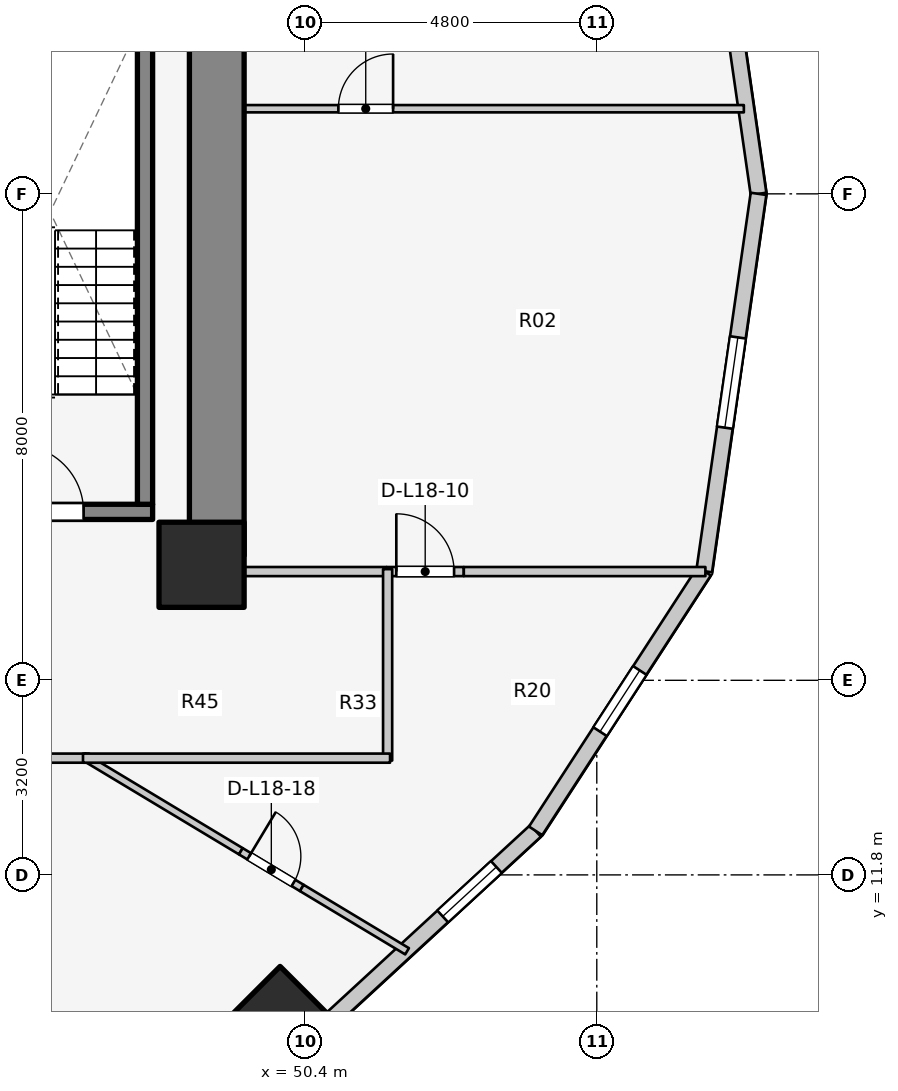
"""IFC4 building model, lengths in metres.
Left out: names, types, materials, properties, quantities, classifications, styles, units other than length and angle.
Written with IfcOpenShell. Run it as: python <this file> out.ifc"""

import sys

from ifc_helpers import new_model, si_unit, direction, frame, frame_2d, origin, origin_2d, place, context, subcontext, project, spatial, rectangle, extrude, element, fill, save


model = new_model("IFC4")
c1 = context("Model", 3, precision=1e-05, world=origin(), true_north=direction((0.0, 1.0)))
c2 = subcontext(c1, "Body", "Model", "MODEL_VIEW")
j1 = project(units=[si_unit("LENGTHUNIT", "METRE"), si_unit("PLANEANGLEUNIT", "RADIAN")], contexts=[c1])
p1 = place(None, origin())
s1 = spatial("IfcSite", under=j1, at=p1, CompositionType="ELEMENT")
p2 = place(p1, origin())
s2 = spatial("IfcBuilding", under=s1, at=p2, CompositionType="ELEMENT")
p3 = place(p2, frame((0.0, 0.0, 61.7)))
s3 = spatial("IfcBuildingStorey", under=s2, at=p3, CompositionType="ELEMENT", Elevation=61.7)
p4 = place(p3, frame((48.95, 17.05, 0.0), z_axis=(0.0, 0.0, 1.0), x_axis=(0.0, 1.0, 0.0)))
e1 = element("IfcWall", 1, at=p4, inside=s3, PredefinedType="SHEAR", context=c2, shape_type="SweptSolid", body=[
    extrude(rectangle(XDim=12.8, YDim=0.9, at=frame_2d((6.4, 0.0))), origin(), (0.0, 0.0, 1.0), 3.1),
])
p5 = place(p3, frame((44.525, 17.77, 0.0), z_axis=(0.0, 0.0, 1.0), x_axis=(1.0, 0.0, 0.0)))
e2 = element("IfcWall", 2, at=p5, inside=s3, PredefinedType="SOLIDWALL", context=c2, shape_type="SweptSolid", body=[
    extrude(rectangle(XDim=3.37, YDim=0.25, at=frame_2d((1.685, 0.0))), origin(), (0.0, 0.0, 1.0), 3.1),
])
p6 = place(p5, frame((1.135, 0.0, 0.0)))
e3 = element("IfcOpeningElement", 3, at=p6, cuts=e2, PredefinedType="OPENING", context=c2, shape_type="SweptSolid", body=[
    extrude(rectangle(XDim=1.1, YDim=2.1, at=frame_2d((0.55, 1.05))), frame((0.0, 0.135, 0.0), z_axis=(0.0, -1.0, 0.0), x_axis=(1.0, 0.0, 0.0)), (0.0, 0.0, 1.0), 0.27),
])
p7 = place(p3, frame((47.77, 17.895, 0.0), z_axis=(0.0, 0.0, 1.0), x_axis=(0.0, 1.0, 0.0)))
e4 = element("IfcWall", 4, at=p7, inside=s3, PredefinedType="SOLIDWALL", context=c2, shape_type="SweptSolid", body=[
    extrude(rectangle(XDim=7.81, YDim=0.25, at=frame_2d((3.905, 0.0))), origin(), (0.0, 0.0, 1.0), 3.1),
])
p8 = place(p3, frame((48.7, 16.9, 0.0), z_axis=(0.0, 0.0, 1.0), x_axis=(1.0, 0.0, 0.0)))
e5 = element("IfcColumn", 5, at=p8, inside=s3, PredefinedType="COLUMN", context=c2, shape_type="SweptSolid", body=[
    extrude(rectangle(XDim=1.4, YDim=1.4, at=origin_2d()), origin(), (0.0, 0.0, 1.0), 3.1),
])
p9 = place(p3, frame((49.992, 9.446, 0.0), z_axis=(0.0, 0.0, 1.0), x_axis=(0.707106781187, -0.707106781187, 0.0)))
e6 = element("IfcColumn", 6, at=p9, inside=s3, PredefinedType="COLUMN", context=c2, shape_type="SweptSolid", body=[
    extrude(rectangle(XDim=1.2, YDim=1.2, at=origin_2d()), origin(), (0.0, 0.0, 1.0), 3.1),
])
p10 = place(p3, frame((57.86, 23.0, 0.0), z_axis=(0.0, 0.0, 1.0), x_axis=(-0.142528001686, 0.989790770181, 0.0)))
e7 = element("IfcWall", 7, at=p10, inside=s3, PredefinedType="STANDARD", context=c2, shape_type="SweptSolid", body=[
    extrude(rectangle(XDim=6.269, YDim=0.26, at=frame_2d((3.135, 0.0))), origin(), (0.0, 0.0, 1.0), 2.57),
])
p11 = place(p10, frame((3.217, 0.0, 0.75)))
e8 = element("IfcOpeningElement", 8, at=p11, cuts=e7, PredefinedType="OPENING", context=c2, shape_type="SweptSolid", body=[
    extrude(rectangle(XDim=1.2, YDim=1.5, at=frame_2d((0.6, 0.75))), frame((0.0, 0.14, 0.0), z_axis=(0.0, -1.0, 0.0), x_axis=(1.0, 0.0, 0.0)), (0.0, 0.0, 1.0), 0.28),
])
p12 = place(p3, frame((50.405, 9.035, 0.0), z_axis=(0.0, 0.0, 1.0), x_axis=(0.735655109293, 0.67735630223, 0.0)))
e9 = element("IfcWall", 9, at=p12, inside=s3, PredefinedType="STANDARD", context=c2, shape_type="SweptSolid", body=[
    extrude(rectangle(XDim=5.151, YDim=0.26, at=frame_2d((2.575, 0.0))), origin(), (0.0, 0.0, 1.0), 1.22),
])
p13 = place(p12, frame((3.074, 0.0, 0.15)))
e10 = element("IfcOpeningElement", 10, at=p13, cuts=e9, PredefinedType="OPENING", context=c2, shape_type="SweptSolid", body=[
    extrude(rectangle(XDim=1.2, YDim=0.9, at=frame_2d((0.6, 0.45))), frame((0.0, 0.14, 0.0), z_axis=(0.0, -1.0, 0.0), x_axis=(1.0, 0.0, 0.0)), (0.0, 0.0, 1.0), 0.28),
])
p14 = place(p3, frame((54.194, 12.524, 0.0), z_axis=(0.0, 0.0, 1.0), x_axis=(0.544578722263, 0.838709732421, 0.0)))
e11 = element("IfcWall", 11, at=p14, inside=s3, PredefinedType="STANDARD", context=c2, shape_type="SweptSolid", body=[
    extrude(rectangle(XDim=5.092, YDim=0.26, at=frame_2d((2.546, 0.0))), origin(), (0.0, 0.0, 1.0), 1.22),
])
p15 = place(p14, frame((1.946, 0.0, 0.15)))
e12 = element("IfcOpeningElement", 12, at=p15, cuts=e11, PredefinedType="OPENING", context=c2, shape_type="SweptSolid", body=[
    extrude(rectangle(XDim=1.2, YDim=0.9, at=frame_2d((0.6, 0.45))), frame((0.0, 0.14, 0.0), z_axis=(0.0, -1.0, 0.0), x_axis=(1.0, 0.0, 0.0)), (0.0, 0.0, 1.0), 0.28),
])
p16 = place(p3, frame((56.967, 16.795, 0.0), z_axis=(0.0, 0.0, 1.0), x_axis=(0.142528001686, 0.989790770181, 0.0)))
e13 = element("IfcWall", 13, at=p16, inside=s3, PredefinedType="STANDARD", context=c2, shape_type="SweptSolid", body=[
    extrude(rectangle(XDim=6.269, YDim=0.26, at=frame_2d((3.135, 0.0))), origin(), (0.0, 0.0, 1.0), 2.57),
])
p17 = place(p16, frame((2.385, 0.0, 0.75)))
e14 = element("IfcOpeningElement", 14, at=p17, cuts=e13, PredefinedType="OPENING", context=c2, shape_type="SweptSolid", body=[
    extrude(rectangle(XDim=1.5, YDim=1.6, at=frame_2d((0.75, 0.8))), frame((0.0, 0.14, 0.0), z_axis=(0.0, -1.0, 0.0), x_axis=(1.0, 0.0, 0.0)), (0.0, 0.0, 1.0), 0.28),
])
p18 = place(p3, frame((48.95, 16.788, 0.0), z_axis=(0.0, 0.0, 1.0), x_axis=(1.0, 0.0, 0.0)))
e15 = element("IfcWall", 15, at=p18, inside=s3, PredefinedType="PARTITIONING", context=c2, shape_type="SweptSolid", body=[
    extrude(rectangle(XDim=2.793, YDim=0.15, at=frame_2d((1.396, 0.0))), origin(), (0.0, 0.0, 1.0), 1.22),
])
p19 = place(p3, frame((51.743, 16.788, 0.0), z_axis=(0.0, 0.0, 1.0), x_axis=(1.0, 0.0, 0.0)))
e16 = element("IfcWall", 16, at=p19, inside=s3, PredefinedType="PARTITIONING", context=c2, shape_type="SweptSolid", body=[
    extrude(rectangle(XDim=1.27, YDim=0.15, at=frame_2d((0.635, 0.0))), origin(), (0.0, 0.0, 1.0), 2.575),
])
p20 = place(p19, frame((0.16, 0.0, 0.0)))
e17 = element("IfcOpeningElement", 17, at=p20, cuts=e16, PredefinedType="OPENING", context=c2, shape_type="SweptSolid", body=[
    extrude(rectangle(XDim=0.95, YDim=2.1, at=frame_2d((0.475, 1.05))), frame((0.0, 0.085, 0.0), z_axis=(0.0, -1.0, 0.0), x_axis=(1.0, 0.0, 0.0)), (0.0, 0.0, 1.0), 0.17),
])
p21 = place(p3, frame((53.013, 16.788, 0.0), z_axis=(0.0, 0.0, 1.0), x_axis=(1.0, 0.0, 0.0)))
e18 = element("IfcWall", 18, at=p21, inside=s3, PredefinedType="PARTITIONING", context=c2, shape_type="SweptSolid", body=[
    extrude(rectangle(XDim=3.973, YDim=0.15, at=frame_2d((1.987, 0.0))), origin(), (0.0, 0.0, 1.0), 2.575),
])
p22 = place(p3, frame((48.95, 24.4, 0.0), z_axis=(0.0, 0.0, 1.0), x_axis=(1.0, 0.0, 0.0)))
e19 = element("IfcWall", 19, at=p22, inside=s3, PredefinedType="MOVABLE", context=c2, shape_type="SweptSolid", body=[
    extrude(rectangle(XDim=8.669, YDim=0.12, at=frame_2d((4.334, 0.0))), origin(), (0.0, 0.0, 1.0), 2.575),
])
p23 = place(p22, frame((2.0, 0.0, 0.0)))
e20 = element("IfcOpeningElement", 20, at=p23, cuts=e19, PredefinedType="OPENING", context=c2, shape_type="SweptSolid", body=[
    extrude(rectangle(XDim=0.9, YDim=2.1, at=frame_2d((0.45, 1.05))), frame((0.0, 0.07, 0.0), z_axis=(0.0, -1.0, 0.0), x_axis=(1.0, 0.0, 0.0)), (0.0, 0.0, 1.0), 0.14),
])
p24 = place(p3, frame((51.76, 13.68, 0.0), z_axis=(0.0, 0.0, 1.0), x_axis=(0.0, 1.0, 0.0)))
e21 = element("IfcWall", 21, at=p24, inside=s3, PredefinedType="PARTITIONING", context=c2, shape_type="SweptSolid", body=[
    extrude(rectangle(XDim=3.148, YDim=0.15, at=frame_2d((1.574, 0.0))), origin(), (0.0, 0.0, 1.0), 2.575),
])
p25 = place(p3, frame((46.757, 13.746, 0.0), z_axis=(0.0, 0.0, 1.0), x_axis=(0.85690055002, -0.515481762408, 0.0)))
e22 = element("IfcWall", 22, at=p25, inside=s3, PredefinedType="MOVABLE", context=c2, shape_type="SweptSolid", body=[
    extrude(rectangle(XDim=3.021, YDim=0.12, at=frame_2d((1.511, 0.0))), origin(), (0.0, 0.0, 1.0), 1.22),
])
p26 = place(p3, frame((49.346, 12.188, 0.0), z_axis=(0.0, 0.0, 1.0), x_axis=(0.856958544896, -0.515385343534, 0.0)))
e23 = element("IfcWall", 23, at=p26, inside=s3, PredefinedType="MOVABLE", context=c2, shape_type="SweptSolid", body=[
    extrude(rectangle(XDim=1.17, YDim=0.12, at=frame_2d((0.585, 0.0))), origin(), (0.0, 0.0, 1.0), 2.11),
])
p27 = place(p26, frame((0.16, 0.0, 0.0)))
e24 = element("IfcOpeningElement", 24, at=p27, cuts=e23, PredefinedType="OPENING", context=c2, shape_type="SweptSolid", body=[
    extrude(rectangle(XDim=0.85, YDim=2.05, at=frame_2d((0.425, 1.025))), frame((0.0, 0.07, 0.0), z_axis=(0.0, -1.0, 0.0), x_axis=(1.0, 0.0, 0.0)), (0.0, 0.0, 1.0), 0.14),
])
p28 = place(p3, frame((50.349, 11.585, 0.0), z_axis=(0.0, 0.0, 1.0), x_axis=(0.856884567555, -0.515508329599, 0.0)))
e25 = element("IfcWall", 25, at=p28, inside=s3, PredefinedType="MOVABLE", context=c2, shape_type="SweptSolid", body=[
    extrude(rectangle(XDim=2.02, YDim=0.12, at=frame_2d((1.01, 0.0))), origin(), (0.0, 0.0, 1.0), 2.575),
])
p29 = place(p3, frame((45.61, 13.72, 0.0), z_axis=(0.0, 0.0, 1.0), x_axis=(1.0, 0.0, 0.0)))
e26 = element("IfcWall", 26, at=p29, inside=s3, PredefinedType="PARTITIONING", context=c2, shape_type="SweptSolid", body=[
    extrude(rectangle(XDim=1.24, YDim=0.15, at=frame_2d((0.62, 0.0))), origin(), (0.0, 0.0, 1.0), 2.575),
])
p30 = place(p3, frame((46.75, 13.72, 0.0), z_axis=(0.0, 0.0, 1.0), x_axis=(1.0, 0.0, 0.0)))
e27 = element("IfcWall", 27, at=p30, inside=s3, PredefinedType="PARTITIONING", context=c2, shape_type="SweptSolid", body=[
    extrude(rectangle(XDim=5.05, YDim=0.15, at=frame_2d((2.525, 0.0))), origin(), (0.0, 0.0, 1.0), 1.22),
])
p31 = place(p13, origin())
e28 = element("IfcWindow", 28, at=p31, inside=s3, PartitioningType="SINGLE_PANEL", PredefinedType="WINDOW", context=c2, shape_type="SweptSolid", body=[
    extrude(rectangle(XDim=1.2, YDim=0.9, at=frame_2d((0.6, 0.45))), frame((0.0, 0.03, 0.0), z_axis=(0.0, -1.0, 0.0), x_axis=(1.0, 0.0, 0.0)), (0.0, 0.0, 1.0), 0.06),
])
fill(e10, e28)
p32 = place(p15, origin())
e29 = element("IfcWindow", 29, at=p32, inside=s3, PartitioningType="SINGLE_PANEL", PredefinedType="WINDOW", context=c2, shape_type="SweptSolid", body=[
    extrude(rectangle(XDim=1.2, YDim=0.9, at=frame_2d((0.6, 0.45))), frame((0.0, 0.03, 0.0), z_axis=(0.0, -1.0, 0.0), x_axis=(1.0, 0.0, 0.0)), (0.0, 0.0, 1.0), 0.06),
])
fill(e12, e29)
p33 = place(p17, origin())
e30 = element("IfcWindow", 30, at=p33, inside=s3, PartitioningType="SINGLE_PANEL", PredefinedType="WINDOW", context=c2, shape_type="SweptSolid", body=[
    extrude(rectangle(XDim=1.5, YDim=1.6, at=frame_2d((0.75, 0.8))), frame((0.0, 0.03, 0.0), z_axis=(0.0, -1.0, 0.0), x_axis=(1.0, 0.0, 0.0)), (0.0, 0.0, 1.0), 0.06),
])
fill(e14, e30)
p34 = place(p6, origin())
e31 = element("IfcDoor", 31, at=p34, inside=s3, OperationType="SINGLE_SWING_LEFT", PredefinedType="DOOR", context=c2, shape_type="SweptSolid", body=[
    extrude(rectangle(XDim=1.1, YDim=2.1, at=frame_2d((0.55, 1.05))), frame((0.0, 0.025, 0.0), z_axis=(0.0, -1.0, 0.0), x_axis=(1.0, 0.0, 0.0)), (0.0, 0.0, 1.0), 0.05),
])
fill(e3, e31)
p35 = place(p20, origin())
e32 = element("IfcDoor", 32, at=p35, inside=s3, OperationType="SINGLE_SWING_LEFT", PredefinedType="DOOR", context=c2, shape_type="SweptSolid", body=[
    extrude(rectangle(XDim=0.95, YDim=2.1, at=frame_2d((0.475, 1.05))), frame((0.0, 0.025, 0.0), z_axis=(0.0, -1.0, 0.0), x_axis=(1.0, 0.0, 0.0)), (0.0, 0.0, 1.0), 0.05),
])
fill(e17, e32)
p36 = place(p23, origin())
e33 = element("IfcDoor", 33, at=p36, inside=s3, OperationType="SINGLE_SWING_RIGHT", PredefinedType="DOOR", context=c2, shape_type="SweptSolid", body=[
    extrude(rectangle(XDim=0.9, YDim=2.1, at=frame_2d((0.45, 1.05))), frame((0.0, 0.025, 0.0), z_axis=(0.0, -1.0, 0.0), x_axis=(1.0, 0.0, 0.0)), (0.0, 0.0, 1.0), 0.05),
])
fill(e20, e33)
p37 = place(p27, origin())
e34 = element("IfcDoor", 34, at=p37, inside=s3, OperationType="SINGLE_SWING_LEFT", PredefinedType="DOOR", context=c2, shape_type="SweptSolid", body=[
    extrude(rectangle(XDim=0.85, YDim=2.05, at=frame_2d((0.425, 1.025))), frame((0.0, 0.025, 0.0), z_axis=(0.0, -1.0, 0.0), x_axis=(1.0, 0.0, 0.0)), (0.0, 0.0, 1.0), 0.05),
])
fill(e24, e34)
save(model, sys.argv[1])
